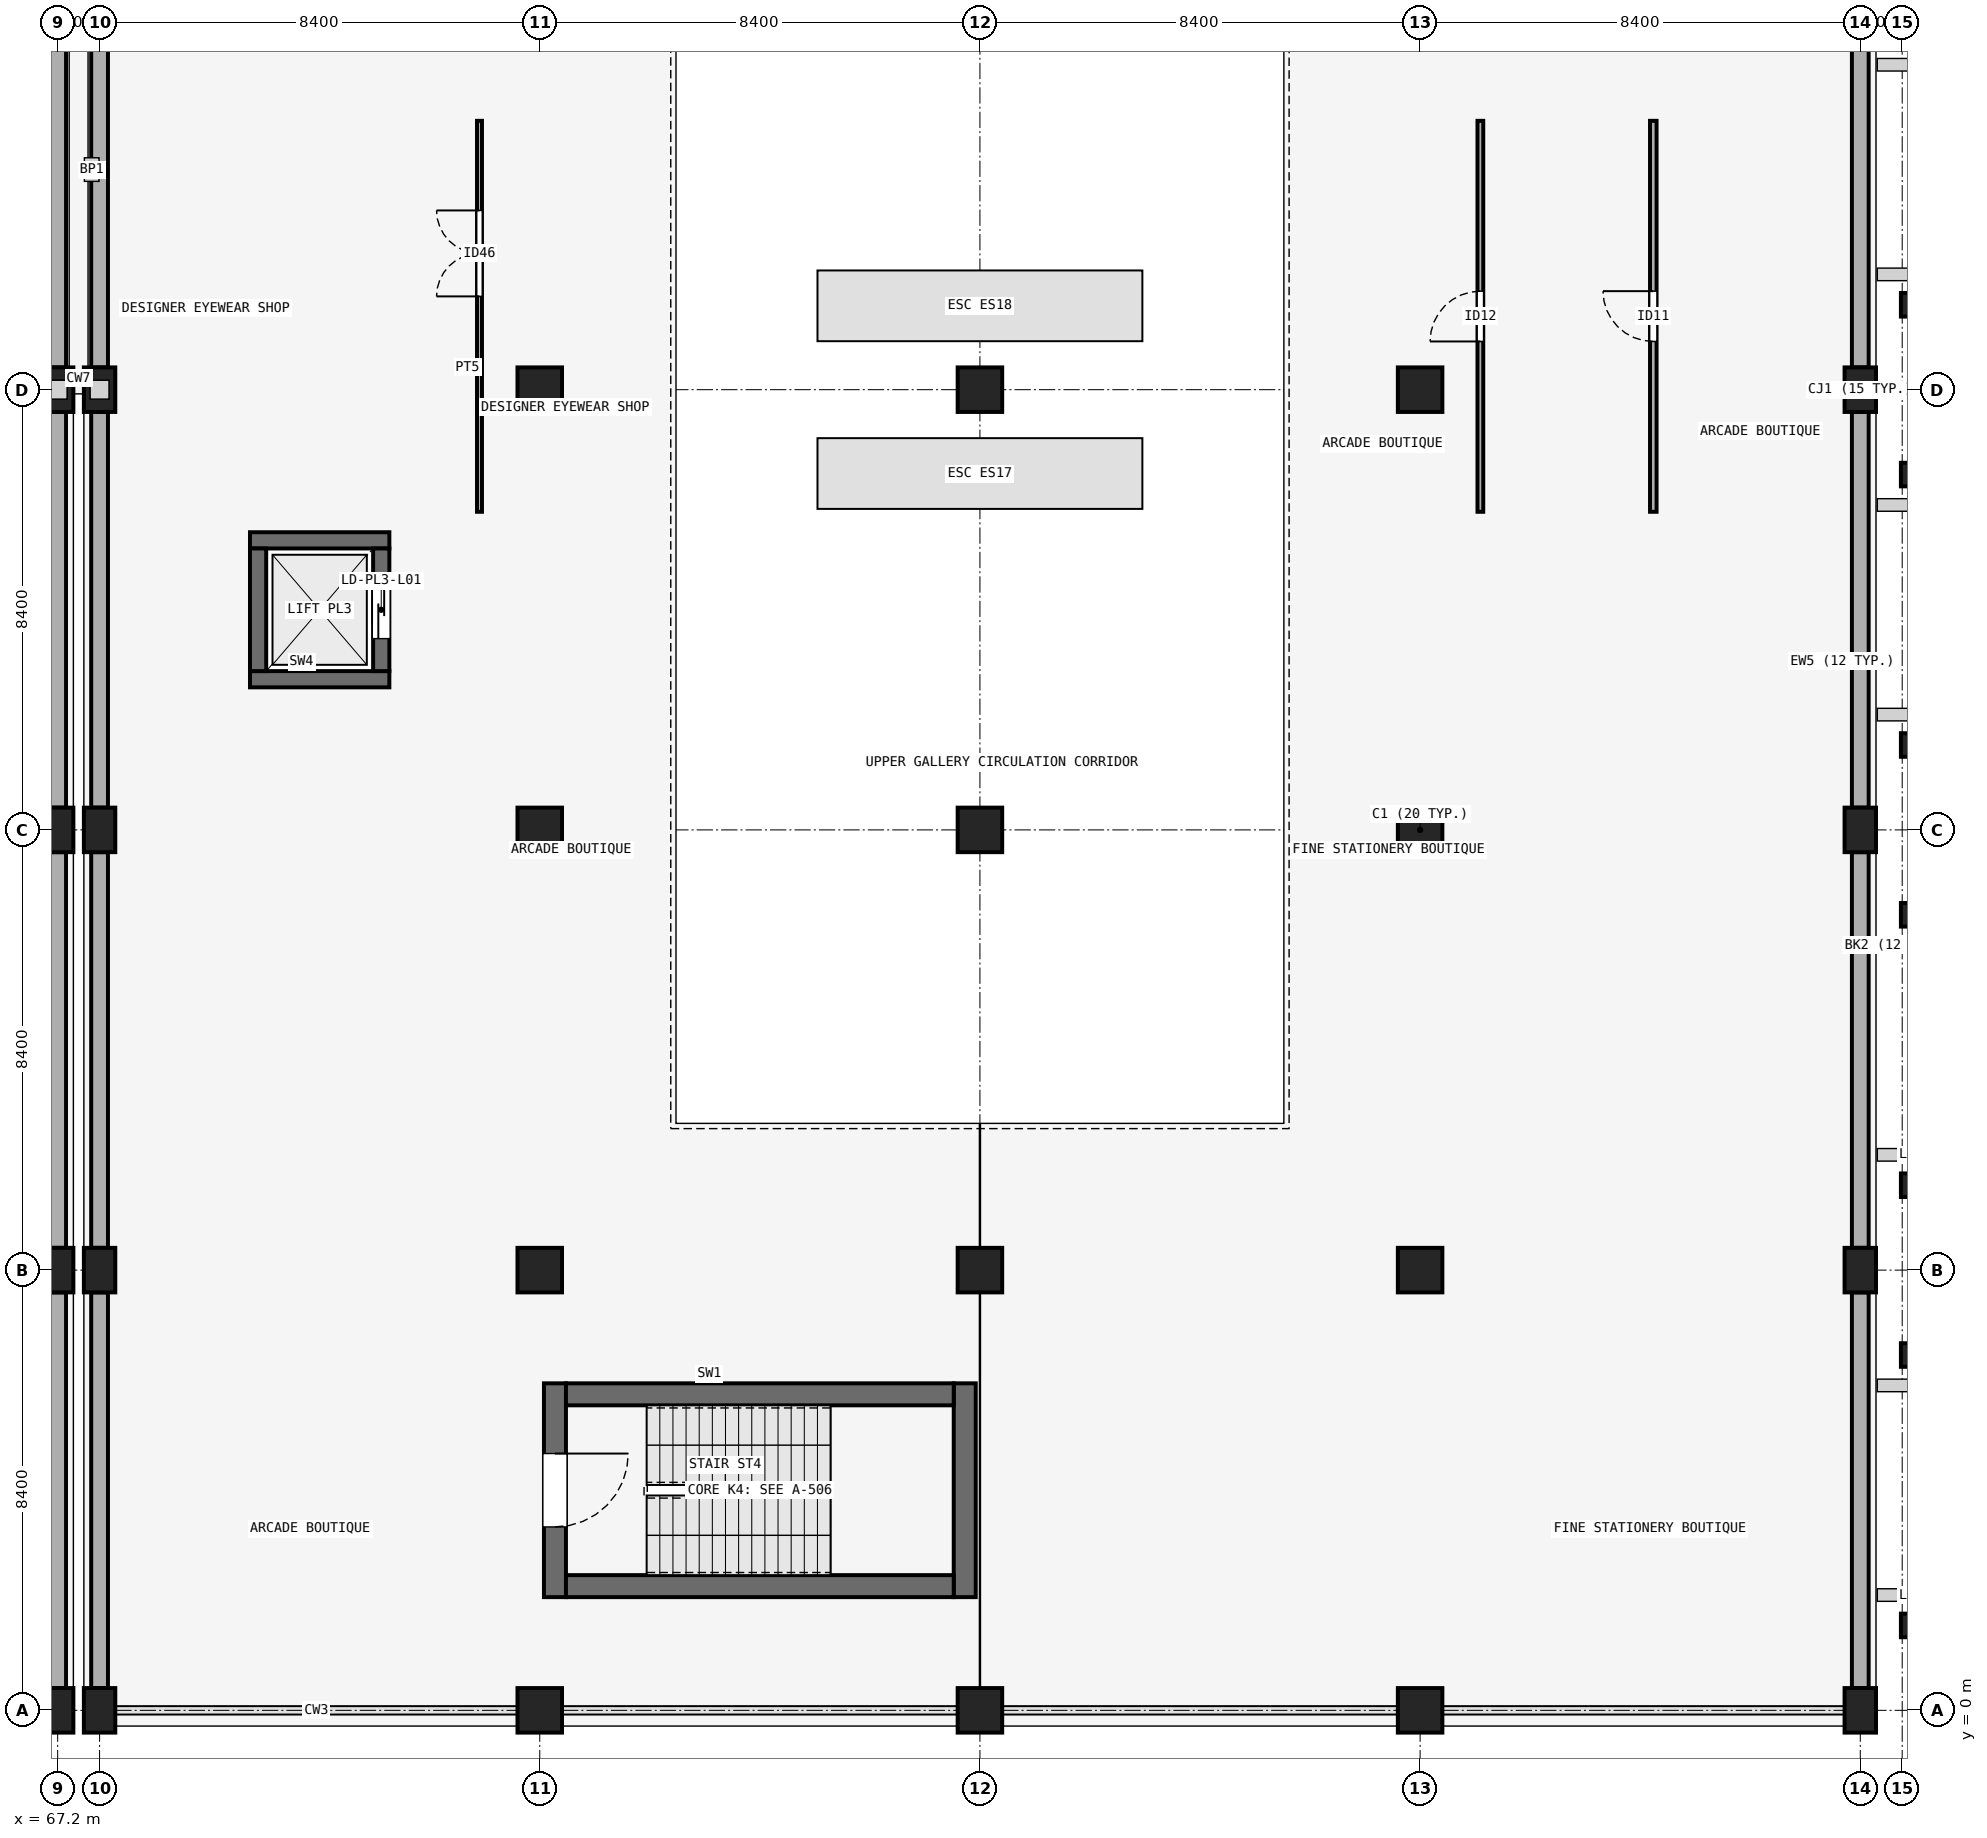
"""IFC4 building model, lengths in metres.
Left out: names, types, materials, properties, quantities, classifications, styles, units other than length and angle.
Written with IfcOpenShell. Run it as: python <this file> out.ifc"""

import sys

from ifc_helpers import new_model, si_unit, direction, frame, frame_2d, origin, origin_2d, place, context, subcontext, project, spatial, rectangle, extrude, element, fill, save


model = new_model("IFC4")
c1 = context("Model", 3, precision=1e-05, world=origin(), true_north=direction((0.0, 1.0)))
c2 = subcontext(c1, "Body", "Model", "MODEL_VIEW")
j1 = project(units=[si_unit("LENGTHUNIT", "METRE"), si_unit("PLANEANGLEUNIT", "RADIAN")], contexts=[c1])
p1 = place(None, origin())
s1 = spatial("IfcSite", under=j1, at=p1, CompositionType="ELEMENT")
p2 = place(p1, origin())
s2 = spatial("IfcBuilding", under=s1, at=p2, CompositionType="ELEMENT")
p3 = place(p2, frame((0.0, 0.0, 5.4)))
s3 = spatial("IfcBuildingStorey", under=s2, at=p3, CompositionType="ELEMENT", Elevation=5.4)
p4 = place(p3, frame((68.0, 0.0, 0.0), z_axis=(0.0, 0.0, 1.0), x_axis=(1.0, 0.0, 0.0)))
e1 = element("IfcColumn", 1, at=p4, inside=s3, PredefinedType="COLUMN", context=c2, shape_type="SweptSolid", body=[
    extrude(rectangle(XDim=0.6, YDim=0.85, at=origin_2d()), origin(), (0.0, 0.0, 1.0), 4.5),
])
for number, where, z_axis, x_axis in (
    (2, (76.4, 0.0, 0.0), (0.0, 0.0, 1.0), (1.0, 0.0, 0.0)),
    (3, (84.8, 0.0, 0.0), (0.0, 0.0, 1.0), (1.0, 0.0, 0.0)),
    (4, (93.2, 0.0, 0.0), (0.0, 0.0, 1.0), (1.0, 0.0, 0.0)),
):
    element("IfcColumn", number, at=place(p3, frame(where, z_axis=z_axis, x_axis=x_axis)), inside=s3, PredefinedType="COLUMN", context=c2, shape_type="SweptSolid", body=[
        extrude(rectangle(XDim=0.85, YDim=0.85, at=origin_2d()), origin(), (0.0, 0.0, 1.0), 4.5),
    ])
for number, where, z_axis, x_axis in (
    (5, (101.6, 0.0, 0.0), (0.0, 0.0, 1.0), (1.0, 0.0, 0.0)),
    (6, (68.0, 8.4, 0.0), (0.0, 0.0, 1.0), (1.0, 0.0, 0.0)),
):
    element("IfcColumn", number, at=place(p3, frame(where, z_axis=z_axis, x_axis=x_axis)), inside=s3, PredefinedType="COLUMN", context=c2, shape_type="SweptSolid", body=[
        extrude(rectangle(XDim=0.6, YDim=0.85, at=origin_2d()), origin(), (0.0, 0.0, 1.0), 4.5),
    ])
for number, where, z_axis, x_axis in (
    (7, (76.4, 8.4, 0.0), (0.0, 0.0, 1.0), (1.0, 0.0, 0.0)),
    (8, (84.8, 8.4, 0.0), (0.0, 0.0, 1.0), (1.0, 0.0, 0.0)),
    (9, (93.2, 8.4, 0.0), (0.0, 0.0, 1.0), (1.0, 0.0, 0.0)),
):
    element("IfcColumn", number, at=place(p3, frame(where, z_axis=z_axis, x_axis=x_axis)), inside=s3, PredefinedType="COLUMN", context=c2, shape_type="SweptSolid", body=[
        extrude(rectangle(XDim=0.85, YDim=0.85, at=origin_2d()), origin(), (0.0, 0.0, 1.0), 4.5),
    ])
for number, where, z_axis, x_axis in (
    (10, (101.6, 8.4, 0.0), (0.0, 0.0, 1.0), (1.0, 0.0, 0.0)),
    (11, (68.0, 16.8, 0.0), (0.0, 0.0, 1.0), (1.0, 0.0, 0.0)),
):
    element("IfcColumn", number, at=place(p3, frame(where, z_axis=z_axis, x_axis=x_axis)), inside=s3, PredefinedType="COLUMN", context=c2, shape_type="SweptSolid", body=[
        extrude(rectangle(XDim=0.6, YDim=0.85, at=origin_2d()), origin(), (0.0, 0.0, 1.0), 4.5),
    ])
for number, where, z_axis, x_axis in (
    (12, (76.4, 16.8, 0.0), (0.0, 0.0, 1.0), (1.0, 0.0, 0.0)),
    (13, (84.8, 16.8, 0.0), (0.0, 0.0, 1.0), (1.0, 0.0, 0.0)),
    (14, (93.2, 16.8, 0.0), (0.0, 0.0, 1.0), (1.0, 0.0, 0.0)),
):
    element("IfcColumn", number, at=place(p3, frame(where, z_axis=z_axis, x_axis=x_axis)), inside=s3, PredefinedType="COLUMN", context=c2, shape_type="SweptSolid", body=[
        extrude(rectangle(XDim=0.85, YDim=0.85, at=origin_2d()), origin(), (0.0, 0.0, 1.0), 4.5),
    ])
for number, where, z_axis, x_axis in (
    (15, (101.6, 16.8, 0.0), (0.0, 0.0, 1.0), (1.0, 0.0, 0.0)),
    (16, (68.0, 25.2, 0.0), (0.0, 0.0, 1.0), (1.0, 0.0, 0.0)),
):
    element("IfcColumn", number, at=place(p3, frame(where, z_axis=z_axis, x_axis=x_axis)), inside=s3, PredefinedType="COLUMN", context=c2, shape_type="SweptSolid", body=[
        extrude(rectangle(XDim=0.6, YDim=0.85, at=origin_2d()), origin(), (0.0, 0.0, 1.0), 4.5),
    ])
for number, where, z_axis, x_axis in (
    (17, (76.4, 25.2, 0.0), (0.0, 0.0, 1.0), (1.0, 0.0, 0.0)),
    (18, (84.8, 25.2, 0.0), (0.0, 0.0, 1.0), (1.0, 0.0, 0.0)),
    (19, (93.2, 25.2, 0.0), (0.0, 0.0, 1.0), (1.0, 0.0, 0.0)),
):
    element("IfcColumn", number, at=place(p3, frame(where, z_axis=z_axis, x_axis=x_axis)), inside=s3, PredefinedType="COLUMN", context=c2, shape_type="SweptSolid", body=[
        extrude(rectangle(XDim=0.85, YDim=0.85, at=origin_2d()), origin(), (0.0, 0.0, 1.0), 4.5),
    ])
for number, where, z_axis, x_axis in (
    (20, (101.6, 25.2, 0.0), (0.0, 0.0, 1.0), (1.0, 0.0, 0.0)),
    (21, (67.2, 0.0, 0.0), (0.0, 0.0, 1.0), (1.0, 0.0, 0.0)),
    (22, (67.2, 8.4, 0.0), (0.0, 0.0, 1.0), (1.0, 0.0, 0.0)),
    (23, (67.2, 16.8, 0.0), (0.0, 0.0, 1.0), (1.0, 0.0, 0.0)),
    (24, (67.2, 25.2, 0.0), (0.0, 0.0, 1.0), (1.0, 0.0, 0.0)),
):
    element("IfcColumn", number, at=place(p3, frame(where, z_axis=z_axis, x_axis=x_axis)), inside=s3, PredefinedType="COLUMN", context=c2, shape_type="SweptSolid", body=[
        extrude(rectangle(XDim=0.6, YDim=0.85, at=origin_2d()), origin(), (0.0, 0.0, 1.0), 4.5),
    ])
for number, where, z_axis, x_axis in (
    (25, (102.65, 1.62, 0.0), (0.0, 0.0, 1.0), (0.0, 1.0, 0.0)),
    (26, (102.65, 6.78, 0.0), (0.0, 0.0, 1.0), (0.0, 1.0, 0.0)),
    (27, (102.65, 10.02, 0.0), (0.0, 0.0, 1.0), (0.0, 1.0, 0.0)),
    (28, (102.65, 15.18, 0.0), (0.0, 0.0, 1.0), (0.0, 1.0, 0.0)),
    (29, (102.65, 18.42, 0.0), (0.0, 0.0, 1.0), (0.0, 1.0, 0.0)),
    (30, (102.65, 23.58, 0.0), (0.0, 0.0, 1.0), (0.0, 1.0, 0.0)),
    (31, (102.65, 26.82, 0.0), (0.0, 0.0, 1.0), (0.0, 1.0, 0.0)),
):
    element("IfcColumn", number, at=place(p3, frame(where, z_axis=z_axis, x_axis=x_axis)), inside=s3, PredefinedType="PILASTER", context=c2, shape_type="SweptSolid", body=[
        extrude(rectangle(XDim=0.45, YDim=0.55, at=origin_2d()), origin(), (0.0, 0.0, 1.0), 4.5),
    ])
for number, where, z_axis, x_axis in (
    (32, (68.0, 0.425, 0.0), (0.0, 0.0, 1.0), (0.0, 1.0, 0.0)),
    (33, (68.0, 8.825, 0.0), (0.0, 0.0, 1.0), (0.0, 1.0, 0.0)),
):
    element("IfcWall", number, at=place(p3, frame(where, z_axis=z_axis, x_axis=x_axis)), inside=s3, PredefinedType="SOLIDWALL", context=c2, shape_type="SweptSolid", body=[
        extrude(rectangle(XDim=7.55, YDim=0.32, at=frame_2d((3.775, 0.0))), origin(), (0.0, 0.0, 1.0), 3.45),
    ])
p5 = place(p3, frame((68.0, 17.225, 0.0), z_axis=(0.0, 0.0, 1.0), x_axis=(0.0, 1.0, 0.0)))
e34 = element("IfcWall", 34, at=p5, inside=s3, PredefinedType="SOLIDWALL", context=c2, shape_type="SweptSolid", body=[
    extrude(rectangle(XDim=7.55, YDim=0.32, at=frame_2d((3.775, 0.0))), origin(), (0.0, 0.0, 1.0), 3.45),
])
for number, where, z_axis, x_axis in (
    (35, (68.0, 25.625, 0.0), (0.0, 0.0, 1.0), (0.0, 1.0, 0.0)),
    (36, (101.6, 0.425, 0.0), (0.0, 0.0, 1.0), (0.0, 1.0, 0.0)),
    (37, (101.6, 8.825, 0.0), (0.0, 0.0, 1.0), (0.0, 1.0, 0.0)),
):
    element("IfcWall", number, at=place(p3, frame(where, z_axis=z_axis, x_axis=x_axis)), inside=s3, PredefinedType="SOLIDWALL", context=c2, shape_type="SweptSolid", body=[
        extrude(rectangle(XDim=7.55, YDim=0.32, at=frame_2d((3.775, 0.0))), origin(), (0.0, 0.0, 1.0), 3.45),
    ])
p6 = place(p3, frame((101.6, 17.225, 0.0), z_axis=(0.0, 0.0, 1.0), x_axis=(0.0, 1.0, 0.0)))
e38 = element("IfcWall", 38, at=p6, inside=s3, PredefinedType="SOLIDWALL", context=c2, shape_type="SweptSolid", body=[
    extrude(rectangle(XDim=7.55, YDim=0.32, at=frame_2d((3.775, 0.0))), origin(), (0.0, 0.0, 1.0), 3.45),
])
p7 = place(p3, frame((101.6, 25.625, 0.0), z_axis=(0.0, 0.0, 1.0), x_axis=(0.0, 1.0, 0.0)))
e39 = element("IfcWall", 39, at=p7, inside=s3, PredefinedType="SOLIDWALL", context=c2, shape_type="SweptSolid", body=[
    extrude(rectangle(XDim=7.55, YDim=0.32, at=frame_2d((3.775, 0.0))), origin(), (0.0, 0.0, 1.0), 3.45),
])
for number, where, z_axis, x_axis in (
    (40, (67.2, 0.425, 0.0), (0.0, 0.0, 1.0), (0.0, 1.0, 0.0)),
    (41, (67.2, 8.825, 0.0), (0.0, 0.0, 1.0), (0.0, 1.0, 0.0)),
):
    element("IfcWall", number, at=place(p3, frame(where, z_axis=z_axis, x_axis=x_axis)), inside=s3, PredefinedType="SOLIDWALL", context=c2, shape_type="SweptSolid", body=[
        extrude(rectangle(XDim=7.55, YDim=0.32, at=frame_2d((3.775, 0.0))), origin(), (0.0, 0.0, 1.0), 3.43),
    ])
p8 = place(p3, frame((67.2, 17.225, 0.0), z_axis=(0.0, 0.0, 1.0), x_axis=(0.0, 1.0, 0.0)))
e42 = element("IfcWall", 42, at=p8, inside=s3, PredefinedType="SOLIDWALL", context=c2, shape_type="SweptSolid", body=[
    extrude(rectangle(XDim=7.55, YDim=0.32, at=frame_2d((3.775, 0.0))), origin(), (0.0, 0.0, 1.0), 3.43),
])
p9 = place(p3, frame((67.2, 25.625, 0.0), z_axis=(0.0, 0.0, 1.0), x_axis=(0.0, 1.0, 0.0)))
e43 = element("IfcWall", 43, at=p9, inside=s3, PredefinedType="SOLIDWALL", context=c2, shape_type="SweptSolid", body=[
    extrude(rectangle(XDim=7.55, YDim=0.32, at=frame_2d((3.775, 0.0))), origin(), (0.0, 0.0, 1.0), 3.43),
])
p10 = place(p3, frame((76.69, 6.24, 0.0), z_axis=(0.0, 0.0, 1.0), x_axis=(0.0, -1.0, 0.0)))
e44 = element("IfcWall", 44, at=p10, inside=s3, PredefinedType="SHEAR", context=c2, shape_type="SweptSolid", body=[
    extrude(rectangle(XDim=4.08, YDim=0.42, at=frame_2d((2.04, 0.0))), origin(), (0.0, 0.0, 1.0), 4.2),
])
p11 = place(p10, frame((1.34, 0.0, 0.0)))
e45 = element("IfcOpeningElement", 45, at=p11, cuts=e44, PredefinedType="OPENING", context=c2, shape_type="SweptSolid", body=[
    extrude(rectangle(XDim=1.4, YDim=2.15, at=frame_2d((0.7, 1.075))), frame((0.0, 0.22, 0.0), z_axis=(0.0, -1.0, 0.0), x_axis=(1.0, 0.0, 0.0)), (0.0, 0.0, 1.0), 0.44),
])
p12 = place(p3, frame((84.51, 2.16, 0.0), z_axis=(0.0, 0.0, 1.0), x_axis=(0.0, 1.0, 0.0)))
e46 = element("IfcWall", 46, at=p12, inside=s3, PredefinedType="SHEAR", context=c2, shape_type="SweptSolid", body=[
    extrude(rectangle(XDim=4.08, YDim=0.42, at=frame_2d((2.04, 0.0))), origin(), (0.0, 0.0, 1.0), 4.2),
])
for number, where, z_axis, x_axis in (
    (47, (76.9, 2.37, 0.0), (0.0, 0.0, 1.0), (1.0, 0.0, 0.0)),
    (48, (76.9, 6.03, 0.0), (0.0, 0.0, 1.0), (1.0, 0.0, 0.0)),
):
    element("IfcWall", number, at=place(p3, frame(where, z_axis=z_axis, x_axis=x_axis)), inside=s3, PredefinedType="SHEAR", context=c2, shape_type="SweptSolid", body=[
        extrude(rectangle(XDim=7.4, YDim=0.42, at=frame_2d((3.7, 0.0))), origin(), (0.0, 0.0, 1.0), 4.2),
    ])
for number, where, z_axis, x_axis in (
    (49, (70.87, 19.675, 0.0), (0.0, 0.0, 1.0), (1.0, 0.0, 0.0)),
    (50, (70.87, 22.325, 0.0), (0.0, 0.0, 1.0), (1.0, 0.0, 0.0)),
):
    element("IfcWall", number, at=place(p3, frame(where, z_axis=z_axis, x_axis=x_axis)), inside=s3, PredefinedType="SHEAR", context=c2, shape_type="SweptSolid", body=[
        extrude(rectangle(XDim=2.66, YDim=0.31, at=frame_2d((1.33, 0.0))), origin(), (0.0, 0.0, 1.0), 4.2),
    ])
p13 = place(p3, frame((71.025, 19.83, 0.0), z_axis=(0.0, 0.0, 1.0), x_axis=(0.0, 1.0, 0.0)))
e51 = element("IfcWall", 51, at=p13, inside=s3, PredefinedType="SHEAR", context=c2, shape_type="SweptSolid", body=[
    extrude(rectangle(XDim=2.34, YDim=0.31, at=frame_2d((1.17, 0.0))), origin(), (0.0, 0.0, 1.0), 4.2),
])
p14 = place(p3, frame((73.375, 19.83, 0.0), z_axis=(0.0, 0.0, 1.0), x_axis=(0.0, 1.0, 0.0)))
e52 = element("IfcWall", 52, at=p14, inside=s3, PredefinedType="SHEAR", context=c2, shape_type="SweptSolid", body=[
    extrude(rectangle(XDim=2.34, YDim=0.31, at=frame_2d((1.17, 0.0))), origin(), (0.0, 0.0, 1.0), 4.2),
])
p15 = place(p14, frame((0.62, 0.0, 0.0)))
e53 = element("IfcOpeningElement", 53, at=p15, cuts=e52, PredefinedType="OPENING", context=c2, shape_type="SweptSolid", body=[
    extrude(rectangle(XDim=1.1, YDim=2.2, at=frame_2d((0.55, 1.1))), frame((0.0, 0.165, 0.0), z_axis=(0.0, -1.0, 0.0), x_axis=(1.0, 0.0, 0.0)), (0.0, 0.0, 1.0), 0.33),
])
p16 = place(p3, frame((75.25, 22.87, 0.0), z_axis=(0.0, 0.0, 1.0), x_axis=(0.0, 1.0, 0.0)))
e54 = element("IfcWall", 54, at=p16, inside=s3, PredefinedType="PARTITIONING", context=c2, shape_type="SweptSolid", body=[
    extrude(rectangle(XDim=7.46, YDim=0.095, at=frame_2d((3.73, 0.0))), origin(), (0.0, 0.0, 1.0), 3.5),
])
p17 = place(p16, frame((4.11, 0.0, 0.0)))
e55 = element("IfcOpeningElement", 55, at=p17, cuts=e54, PredefinedType="OPENING", context=c2, shape_type="SweptSolid", body=[
    extrude(rectangle(XDim=1.64, YDim=2.46, at=frame_2d((0.82, 1.23))), frame((0.0, 0.057, 0.0), z_axis=(0.0, -1.0, 0.0), x_axis=(1.0, 0.0, 0.0)), (0.0, 0.0, 1.0), 0.115),
])
p18 = place(p3, frame((97.65, 22.87, 0.0), z_axis=(0.0, 0.0, 1.0), x_axis=(0.0, 1.0, 0.0)))
e56 = element("IfcWall", 56, at=p18, inside=s3, PredefinedType="PARTITIONING", context=c2, shape_type="SweptSolid", body=[
    extrude(rectangle(XDim=7.46, YDim=0.125, at=frame_2d((3.73, 0.0))), origin(), (0.0, 0.0, 1.0), 3.5),
])
p19 = place(p18, frame((3.25, 0.0, 0.0)))
e57 = element("IfcOpeningElement", 57, at=p19, cuts=e56, PredefinedType="OPENING", context=c2, shape_type="SweptSolid", body=[
    extrude(rectangle(XDim=0.96, YDim=2.1, at=frame_2d((0.48, 1.05))), frame((0.0, 0.073, 0.0), z_axis=(0.0, -1.0, 0.0), x_axis=(1.0, 0.0, 0.0)), (0.0, 0.0, 1.0), 0.145),
])
p20 = place(p3, frame((94.35, 22.87, 0.0), z_axis=(0.0, 0.0, 1.0), x_axis=(0.0, 1.0, 0.0)))
e58 = element("IfcWall", 58, at=p20, inside=s3, PredefinedType="PARTITIONING", context=c2, shape_type="SweptSolid", body=[
    extrude(rectangle(XDim=7.46, YDim=0.11, at=frame_2d((3.73, 0.0))), origin(), (0.0, 0.0, 1.0), 3.5),
])
p21 = place(p20, frame((3.25, 0.0, 0.0)))
e59 = element("IfcOpeningElement", 59, at=p21, cuts=e58, PredefinedType="OPENING", context=c2, shape_type="SweptSolid", body=[
    extrude(rectangle(XDim=0.96, YDim=2.22, at=frame_2d((0.48, 1.11))), frame((0.0, 0.065, 0.0), z_axis=(0.0, -1.0, 0.0), x_axis=(1.0, 0.0, 0.0)), (0.0, 0.0, 1.0), 0.13),
])
p22 = place(p11, origin())
e60 = element("IfcDoor", 60, at=p22, inside=s3, OperationType="SINGLE_SWING_LEFT", PredefinedType="DOOR", context=c2, shape_type="SweptSolid", body=[
    extrude(rectangle(XDim=1.4, YDim=2.15, at=frame_2d((0.7, 1.075))), frame((0.0, 0.025, 0.0), z_axis=(0.0, -1.0, 0.0), x_axis=(1.0, 0.0, 0.0)), (0.0, 0.0, 1.0), 0.05),
])
fill(e45, e60)
p23 = place(p15, origin())
e61 = element("IfcDoor", 61, at=p23, inside=s3, OperationType="SLIDING_TO_LEFT", PredefinedType="DOOR", context=c2, shape_type="SweptSolid", body=[
    extrude(rectangle(XDim=1.1, YDim=2.2, at=frame_2d((0.55, 1.1))), frame((0.0, 0.025, 0.0), z_axis=(0.0, -1.0, 0.0), x_axis=(1.0, 0.0, 0.0)), (0.0, 0.0, 1.0), 0.05),
])
fill(e53, e61)
p24 = place(p17, origin())
e62 = element("IfcDoor", 62, at=p24, inside=s3, OperationType="DOUBLE_DOOR_SINGLE_SWING", PredefinedType="DOOR", context=c2, shape_type="SweptSolid", body=[
    extrude(rectangle(XDim=1.64, YDim=2.46, at=frame_2d((0.82, 1.23))), frame((0.0, 0.025, 0.0), z_axis=(0.0, -1.0, 0.0), x_axis=(1.0, 0.0, 0.0)), (0.0, 0.0, 1.0), 0.05),
])
fill(e55, e62)
p25 = place(p19, origin())
e63 = element("IfcDoor", 63, at=p25, inside=s3, OperationType="SINGLE_SWING_RIGHT", PredefinedType="DOOR", context=c2, shape_type="SweptSolid", body=[
    extrude(rectangle(XDim=0.96, YDim=2.1, at=frame_2d((0.48, 1.05))), frame((0.0, 0.025, 0.0), z_axis=(0.0, -1.0, 0.0), x_axis=(1.0, 0.0, 0.0)), (0.0, 0.0, 1.0), 0.05),
])
fill(e57, e63)
p26 = place(p21, origin())
e64 = element("IfcDoor", 64, at=p26, inside=s3, OperationType="SINGLE_SWING_LEFT", PredefinedType="DOOR", context=c2, shape_type="SweptSolid", body=[
    extrude(rectangle(XDim=0.96, YDim=2.22, at=frame_2d((0.48, 1.11))), frame((0.0, 0.025, 0.0), z_axis=(0.0, -1.0, 0.0), x_axis=(1.0, 0.0, 0.0)), (0.0, 0.0, 1.0), 0.05),
])
fill(e59, e64)
save(model, sys.argv[1])
